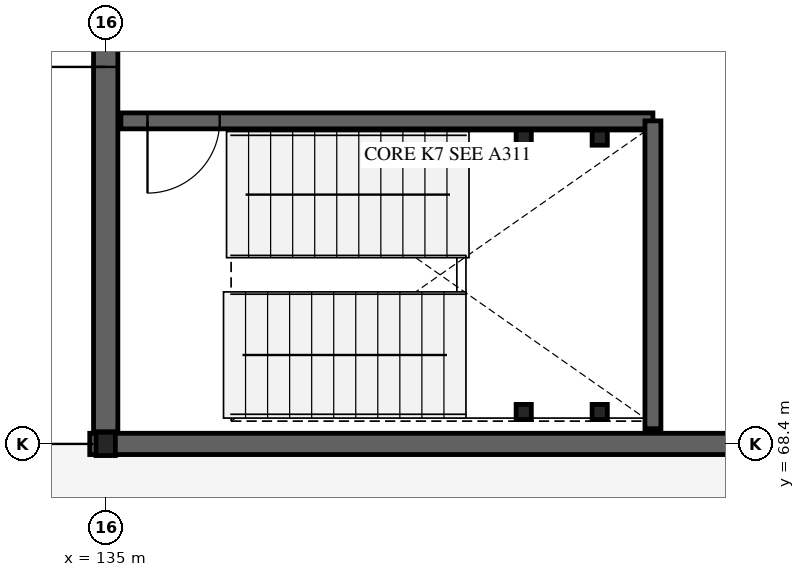
"""IFC4 building model, lengths in metres.
Left out: names, types, materials, properties, quantities, classifications, styles, units other than length and angle.
Written with IfcOpenShell. Run it as: python <this file> out.ifc"""

import sys

from ifc_helpers import new_model, si_unit, direction, frame, frame_2d, origin, origin_2d, place, context, subcontext, project, spatial, rectangle, hollow_rectangle, i_section, extrude, element, fill, save


model = new_model("IFC4")
c1 = context("Model", 3, precision=1e-05, world=origin(), true_north=direction((0.0, 1.0)))
c2 = subcontext(c1, "Body", "Model", "MODEL_VIEW")
j1 = project(units=[si_unit("LENGTHUNIT", "METRE"), si_unit("PLANEANGLEUNIT", "RADIAN")], contexts=[c1])
p1 = place(None, origin())
s1 = spatial("IfcSite", under=j1, at=p1, CompositionType="ELEMENT")
p2 = place(p1, origin())
s2 = spatial("IfcBuilding", under=s1, at=p2, CompositionType="ELEMENT")
p3 = place(p2, frame((0.0, 0.0, 13.68)))
s3 = spatial("IfcBuildingStorey", under=s2, at=p3, CompositionType="ELEMENT", Elevation=13.68)
p4 = place(p3, frame((135.0, 68.4, 0.0), z_axis=(0.0, 0.0, 1.0), x_axis=(1.0, 0.0, 0.0)))
e1 = element("IfcColumn", 1, at=p4, inside=s3, PredefinedType="COLUMN", context=c2, shape_type="SweptSolid", body=[
    extrude(i_section(OverallWidth=0.254, OverallDepth=0.306, WebThickness=0.009, FlangeThickness=0.015, FilletRadius=0.015, at=origin_2d()), origin(), (0.0, 0.0, 1.0), 4.32),
])
p5 = place(p3, frame((134.79, 68.4, 0.0), z_axis=(0.0, 0.0, 1.0), x_axis=(1.0, 0.0, 0.0)))
e2 = element("IfcWall", 2, at=p5, inside=s3, PredefinedType="SOLIDWALL", context=c2, shape_type="SweptSolid", body=[
    extrude(rectangle(XDim=9.42, YDim=0.28, at=frame_2d((4.71, 0.0))), origin(), (0.0, 0.0, 1.0), 4.06),
])
p6 = place(p3, frame((135.0, 68.56, 0.0), z_axis=(0.0, 0.0, 1.0), x_axis=(0.0, 1.0, 0.0)))
e3 = element("IfcWall", 3, at=p6, inside=s3, PredefinedType="SHEAR", context=c2, shape_type="SweptSolid", body=[
    extrude(rectangle(XDim=7.28, YDim=0.32, at=frame_2d((3.64, 0.0))), origin(), (0.0, 0.0, 1.0), 4.04),
])
p7 = place(p6, frame((4.8, 0.0, 0.0)))
e4 = element("IfcOpeningElement", 4, at=p7, cuts=e3, PredefinedType="OPENING", context=c2, shape_type="SweptSolid", body=[
    extrude(rectangle(XDim=1.0, YDim=2.15, at=frame_2d((0.5, 1.075))), frame((0.0, 0.17, 0.0), z_axis=(0.0, -1.0, 0.0), x_axis=(1.0, 0.0, 0.0)), (0.0, 0.0, 1.0), 0.34),
])
p8 = place(p3, frame((135.2, 72.65, 0.0), z_axis=(0.0, 0.0, 1.0), x_axis=(1.0, 0.0, 0.0)))
e5 = element("IfcWall", 5, at=p8, inside=s3, PredefinedType="SOLIDWALL", context=c2, shape_type="SweptSolid", body=[
    extrude(rectangle(XDim=7.0, YDim=0.21, at=frame_2d((3.5, 0.0))), origin(), (0.0, 0.0, 1.0), 4.04),
])
p9 = place(p8, frame((0.35, 0.0, 0.0)))
e6 = element("IfcOpeningElement", 6, at=p9, cuts=e5, PredefinedType="OPENING", context=c2, shape_type="SweptSolid", body=[
    extrude(rectangle(XDim=0.95, YDim=2.12, at=frame_2d((0.475, 1.06))), frame((0.0, 0.115, 0.0), z_axis=(0.0, -1.0, 0.0), x_axis=(1.0, 0.0, 0.0)), (0.0, 0.0, 1.0), 0.23),
])
p10 = place(p3, frame((142.2, 68.6, 0.0), z_axis=(0.0, 0.0, 1.0), x_axis=(0.0, 1.0, 0.0)))
e7 = element("IfcWall", 7, at=p10, inside=s3, PredefinedType="SOLIDWALL", context=c2, shape_type="SweptSolid", body=[
    extrude(rectangle(XDim=4.05, YDim=0.21, at=frame_2d((2.025, 0.0))), origin(), (0.0, 0.0, 1.0), 4.04),
])
for number, where, z_axis, x_axis in (
    (8, (140.5, 68.82, 0.0), (0.0, 0.0, 1.0), (1.0, 0.0, 0.0)),
    (9, (140.5, 72.43, 0.0), (0.0, 0.0, 1.0), (1.0, 0.0, 0.0)),
    (10, (141.5, 68.82, 0.0), (0.0, 0.0, 1.0), (1.0, 0.0, 0.0)),
    (11, (141.5, 72.43, 0.0), (0.0, 0.0, 1.0), (1.0, 0.0, 0.0)),
):
    element("IfcColumn", number, at=place(p3, frame(where, z_axis=z_axis, x_axis=x_axis)), inside=s3, PredefinedType="COLUMN", context=c2, shape_type="SweptSolid", body=[
        extrude(hollow_rectangle(XDim=0.2, YDim=0.2, WallThickness=0.012, at=origin_2d()), origin(), (0.0, 0.0, 1.0), 1.97),
    ])
p11 = place(p9, origin())
e12 = element("IfcDoor", 12, at=p11, inside=s3, OperationType="SINGLE_SWING_RIGHT", PredefinedType="DOOR", context=c2, shape_type="SweptSolid", body=[
    extrude(rectangle(XDim=0.95, YDim=2.12, at=frame_2d((0.475, 1.06))), frame((0.0, 0.025, 0.0), z_axis=(0.0, -1.0, 0.0), x_axis=(1.0, 0.0, 0.0)), (0.0, 0.0, 1.0), 0.05),
])
fill(e6, e12)
p12 = place(p7, origin())
e13 = element("IfcDoor", 13, at=p12, inside=s3, OperationType="SINGLE_SWING_LEFT", PredefinedType="DOOR", context=c2, shape_type="SweptSolid", body=[
    extrude(rectangle(XDim=1.0, YDim=2.15, at=frame_2d((0.5, 1.075))), frame((0.0, 0.025, 0.0), z_axis=(0.0, -1.0, 0.0), x_axis=(1.0, 0.0, 0.0)), (0.0, 0.0, 1.0), 0.05),
])
fill(e4, e13)
save(model, sys.argv[1])
